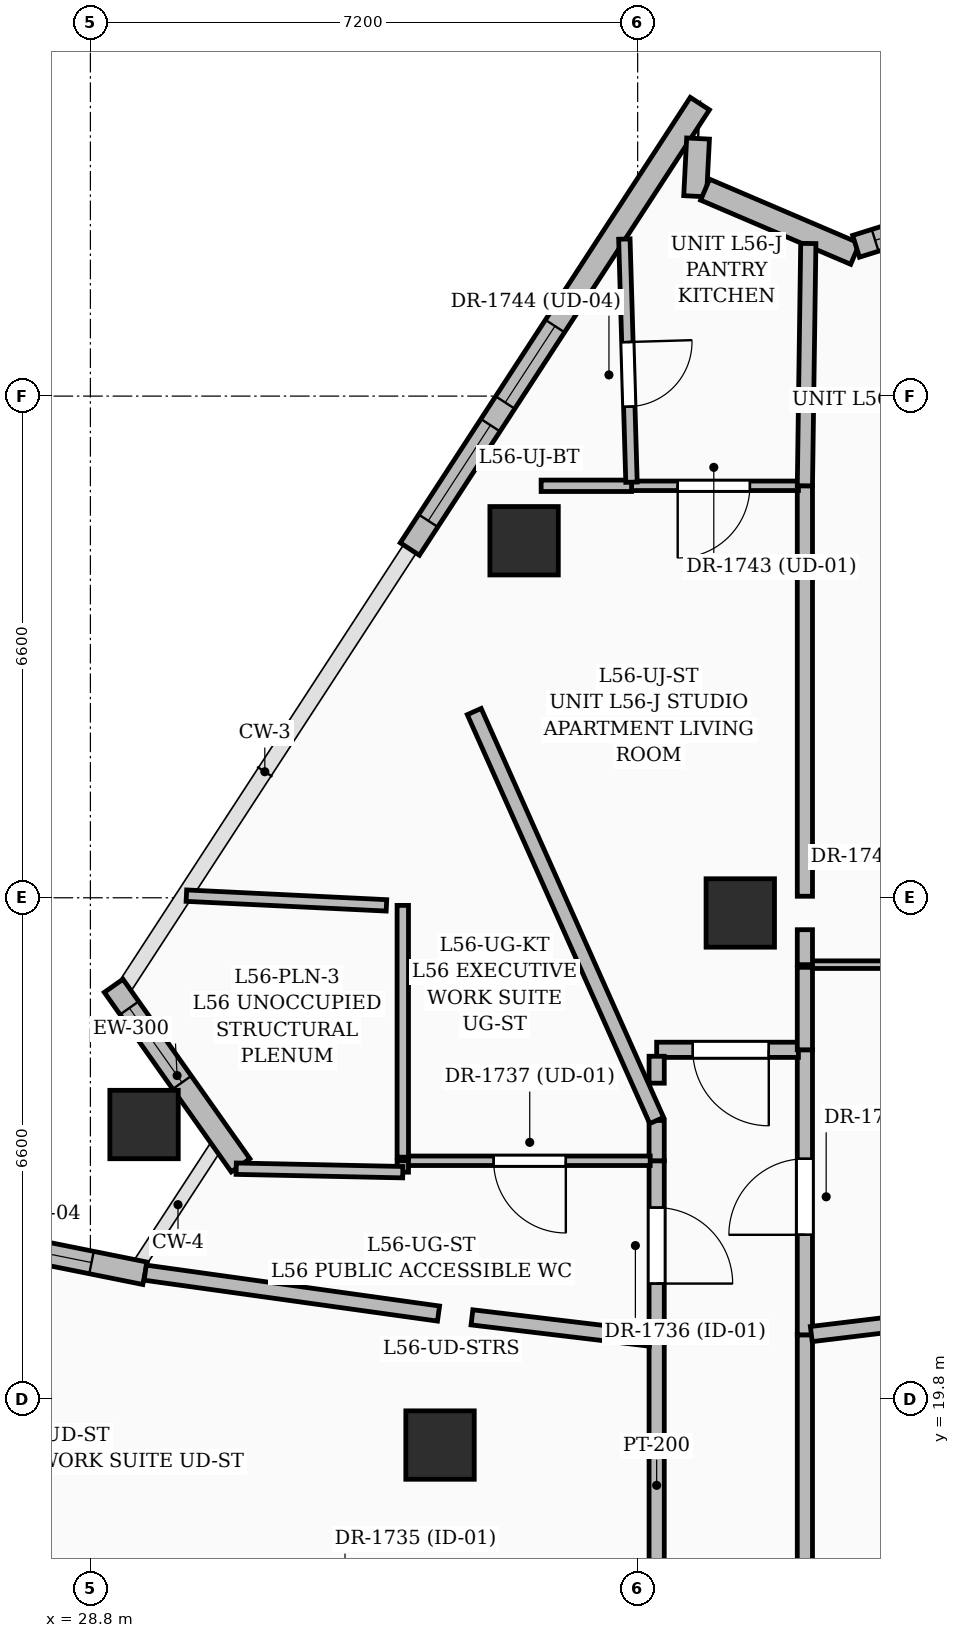
"""IFC4 building model, lengths in metres.
Left out: names, types, materials, properties, quantities, classifications, styles, units other than length and angle.
Written with IfcOpenShell. Run it as: python <this file> out.ifc"""

import sys

from ifc_helpers import new_model, si_unit, direction, frame, frame_2d, origin, origin_2d, place, context, subcontext, project, spatial, rectangle, extrude, element, fill, save


model = new_model("IFC4")
c1 = context("Model", 3, precision=1e-05, world=origin(), true_north=direction((0.0, 1.0)))
c2 = subcontext(c1, "Body", "Model", "MODEL_VIEW")
j1 = project(units=[si_unit("LENGTHUNIT", "METRE"), si_unit("PLANEANGLEUNIT", "RADIAN")], contexts=[c1])
p1 = place(None, origin())
s1 = spatial("IfcSite", under=j1, at=p1, CompositionType="ELEMENT")
p2 = place(p1, origin())
s2 = spatial("IfcBuilding", under=s1, at=p2, CompositionType="ELEMENT")
p3 = place(p2, frame((0.0, 0.0, 218.25)))
s3 = spatial("IfcBuildingStorey", under=s2, at=p3, CompositionType="ELEMENT", Elevation=218.25)
for number, where, z_axis, x_axis in (
    (1, (37.35, 26.2, 0.0), (0.0, 0.0, 1.0), (1.0, 0.0, 0.0)),
    (2, (33.4, 19.2, 0.0), (0.0, 0.0, 1.0), (1.0, 0.0, 0.0)),
    (3, (34.506, 31.097, 0.0), (0.0, 0.0, 1.0), (1.0, 0.0, 0.0)),
    (4, (29.506, 23.417, 0.0), (0.0, 0.0, 1.0), (1.0, 0.0, 0.0)),
):
    element("IfcColumn", number, at=place(p3, frame(where, z_axis=z_axis, x_axis=x_axis)), inside=s3, PredefinedType="COLUMN", context=c2, shape_type="SweptSolid", body=[
        extrude(rectangle(XDim=0.9, YDim=0.9, at=origin_2d()), origin(), (0.0, 0.0, 1.0), 3.75),
    ])
p4 = place(p3, frame((26.977, 21.971, 0.0), z_axis=(0.0, 0.0, 1.0), x_axis=(0.980377387813, -0.197129849249, 0.0)))
e5 = element("IfcWall", 5, at=p4, inside=s3, PredefinedType="SOLIDWALL", context=c2, shape_type="SweptSolid", body=[
    extrude(rectangle(XDim=2.593, YDim=0.3, at=frame_2d((1.297, 0.0))), origin(), (0.0, 0.0, 1.0), 2.825),
])
p5 = place(p4, frame((0.675, 0.0, 0.8)))
e6 = element("IfcOpeningElement", 6, at=p5, cuts=e5, PredefinedType="OPENING", context=c2, shape_type="SweptSolid", body=[
    extrude(rectangle(XDim=1.2, YDim=1.8, at=frame_2d((0.6, 0.9))), frame((0.0, 0.16, 0.0), z_axis=(0.0, -1.0, 0.0), x_axis=(1.0, 0.0, 0.0)), (0.0, 0.0, 1.0), 0.32),
])
p6 = place(p3, frame((30.776, 22.88, 0.0), z_axis=(0.0, 0.0, 1.0), x_axis=(-0.577262988454, 0.816558290731, 0.0)))
e7 = element("IfcWall", 7, at=p6, inside=s3, PredefinedType="SOLIDWALL", context=c2, shape_type="SweptSolid", body=[
    extrude(rectangle(XDim=2.892, YDim=0.3, at=frame_2d((1.446, 0.0))), origin(), (0.0, 0.0, 1.0), 2.825),
])
p7 = place(p6, frame((1.335, 0.0, 0.8)))
e8 = element("IfcOpeningElement", 8, at=p7, cuts=e7, PredefinedType="OPENING", context=c2, shape_type="SweptSolid", body=[
    extrude(rectangle(XDim=1.2, YDim=1.8, at=frame_2d((0.6, 0.9))), frame((0.0, 0.16, 0.0), z_axis=(0.0, -1.0, 0.0), x_axis=(1.0, 0.0, 0.0)), (0.0, 0.0, 1.0), 0.32),
])
p8 = place(p3, frame((33.002, 30.988, 0.0), z_axis=(0.0, 0.0, 1.0), x_axis=(0.545668039772, 0.838001426234, 0.0)))
e9 = element("IfcWall", 9, at=p8, inside=s3, PredefinedType="SOLIDWALL", context=c2, shape_type="SweptSolid", body=[
    extrude(rectangle(XDim=6.993, YDim=0.3, at=frame_2d((3.496, 0.0))), origin(), (0.0, 0.0, 1.0), 3.5),
])
p9 = place(p8, frame((2.3, 0.0, 0.8)))
e10 = element("IfcOpeningElement", 10, at=p9, cuts=e9, PredefinedType="OPENING", context=c2, shape_type="SweptSolid", body=[
    extrude(rectangle(XDim=1.2, YDim=1.8, at=frame_2d((0.6, 0.9))), frame((0.0, 0.16, 0.0), z_axis=(0.0, -1.0, 0.0), x_axis=(1.0, 0.0, 0.0)), (0.0, 0.0, 1.0), 0.32),
])
p10 = place(p8, frame((0.444, 0.0, 0.6)))
e11 = element("IfcOpeningElement", 11, at=p10, cuts=e9, PredefinedType="OPENING", context=c2, shape_type="SweptSolid", body=[
    extrude(rectangle(XDim=1.5, YDim=2.1, at=frame_2d((0.75, 1.05))), frame((0.0, 0.16, 0.0), z_axis=(0.0, -1.0, 0.0), x_axis=(1.0, 0.0, 0.0)), (0.0, 0.0, 1.0), 0.32),
])
p11 = place(p3, frame((36.795, 36.389, 0.0), z_axis=(0.0, 0.0, 1.0), x_axis=(-0.051042347118, -0.998696489831, 0.0)))
e12 = element("IfcWall", 12, at=p11, inside=s3, PredefinedType="SOLIDWALL", context=c2, shape_type="SweptSolid", body=[
    extrude(rectangle(XDim=0.76, YDim=0.3, at=frame_2d((0.38, 0.0))), origin(), (0.0, 0.0, 1.0), 3.5),
])
p12 = place(p3, frame((36.887, 35.716, 0.0), z_axis=(0.0, 0.0, 1.0), x_axis=(0.919567916171, -0.392931097711, 0.0)))
e13 = element("IfcWall", 13, at=p12, inside=s3, PredefinedType="SOLIDWALL", context=c2, shape_type="SweptSolid", body=[
    extrude(rectangle(XDim=2.147, YDim=0.3, at=frame_2d((1.074, 0.0))), origin(), (0.0, 0.0, 1.0), 3.5),
])
p13 = place(p3, frame((38.873, 34.971, 0.0), z_axis=(0.0, 0.0, 1.0), x_axis=(0.954555183372, 0.298034229407, 0.0)))
e14 = element("IfcWall", 14, at=p13, inside=s3, PredefinedType="SOLIDWALL", context=c2, shape_type="SweptSolid", body=[
    extrude(rectangle(XDim=2.136, YDim=0.3, at=frame_2d((1.068, 0.0))), origin(), (0.0, 0.0, 1.0), 3.5),
])
p14 = place(p13, frame((0.263, 0.0, 0.8)))
e15 = element("IfcOpeningElement", 15, at=p14, cuts=e14, PredefinedType="OPENING", context=c2, shape_type="SweptSolid", body=[
    extrude(rectangle(XDim=1.2, YDim=1.8, at=frame_2d((0.6, 0.9))), frame((0.0, 0.16, 0.0), z_axis=(0.0, -1.0, 0.0), x_axis=(1.0, 0.0, 0.0)), (0.0, 0.0, 1.0), 0.32),
])
p15 = place(p3, frame((36.25, 20.59, 0.0), z_axis=(0.0, 0.0, 1.0), x_axis=(0.0, -1.0, 0.0)))
e16 = element("IfcWall", 16, at=p15, inside=s3, PredefinedType="PARTITIONING", context=c2, shape_type="SweptSolid", body=[
    extrude(rectangle(XDim=3.84, YDim=0.2, at=frame_2d((1.92, 0.0))), origin(), (0.0, 0.0, 1.0), 3.5),
])
p16 = place(p3, frame((38.2, 16.835, 0.0), z_axis=(0.0, 0.0, 1.0), x_axis=(0.0, 1.0, 0.0)))
e17 = element("IfcWall", 17, at=p16, inside=s3, PredefinedType="PARTITIONING", context=c2, shape_type="SweptSolid", body=[
    extrude(rectangle(XDim=3.815, YDim=0.2, at=frame_2d((1.907, 0.0))), origin(), (0.0, 0.0, 1.0), 3.5),
])
p17 = place(p3, frame((36.25, 22.94, 0.0), z_axis=(0.0, 0.0, 1.0), x_axis=(0.0, -1.0, 0.0)))
e18 = element("IfcWall", 18, at=p17, inside=s3, PredefinedType="PARTITIONING", context=c2, shape_type="SweptSolid", body=[
    extrude(rectangle(XDim=2.35, YDim=0.2, at=frame_2d((1.175, 0.0))), origin(), (0.0, 0.0, 1.0), 3.5),
])
p18 = place(p17, frame((0.615, 0.0, 0.0)))
e19 = element("IfcOpeningElement", 19, at=p18, cuts=e18, PredefinedType="OPENING", context=c2, shape_type="SweptSolid", body=[
    extrude(rectangle(XDim=1.0, YDim=2.2, at=frame_2d((0.5, 1.1))), frame((0.0, 0.11, 0.0), z_axis=(0.0, -1.0, 0.0), x_axis=(1.0, 0.0, 0.0)), (0.0, 0.0, 1.0), 0.22),
])
p19 = place(p3, frame((36.25, 23.47, 0.0), z_axis=(0.0, 0.0, 1.0), x_axis=(0.0, -1.0, 0.0)))
e20 = element("IfcWall", 20, at=p19, inside=s3, PredefinedType="PARTITIONING", context=c2, shape_type="SweptSolid", body=[
    extrude(rectangle(XDim=0.53, YDim=0.2, at=frame_2d((0.265, 0.0))), origin(), (0.0, 0.0, 1.0), 3.5),
])
p20 = place(p3, frame((38.2, 20.65, 0.0), z_axis=(0.0, 0.0, 1.0), x_axis=(0.0, 1.0, 0.0)))
e21 = element("IfcWall", 21, at=p20, inside=s3, PredefinedType="PARTITIONING", context=c2, shape_type="SweptSolid", body=[
    extrude(rectangle(XDim=3.75, YDim=0.2, at=frame_2d((1.875, 0.0))), origin(), (0.0, 0.0, 1.0), 3.5),
])
p21 = place(p20, frame((1.316, 0.0, 0.0)))
e22 = element("IfcOpeningElement", 22, at=p21, cuts=e21, PredefinedType="OPENING", context=c2, shape_type="SweptSolid", body=[
    extrude(rectangle(XDim=1.0, YDim=2.2, at=frame_2d((0.5, 1.1))), frame((0.0, 0.11, 0.0), z_axis=(0.0, -1.0, 0.0), x_axis=(1.0, 0.0, 0.0)), (0.0, 0.0, 1.0), 0.22),
])
p22 = place(p3, frame((38.115, 24.4, 0.0), z_axis=(0.0, 0.0, 1.0), x_axis=(-1.0, 0.0, 0.0)))
e23 = element("IfcWall", 23, at=p22, inside=s3, PredefinedType="PARTITIONING", context=c2, shape_type="SweptSolid", body=[
    extrude(rectangle(XDim=1.865, YDim=0.2, at=frame_2d((0.933, 0.0))), origin(), (0.0, 0.0, 1.0), 2.685),
])
p23 = place(p22, frame((0.39, 0.0, 0.0)))
e24 = element("IfcOpeningElement", 24, at=p23, cuts=e23, PredefinedType="OPENING", context=c2, shape_type="SweptSolid", body=[
    extrude(rectangle(XDim=1.0, YDim=2.2, at=frame_2d((0.5, 1.1))), frame((0.0, 0.11, 0.0), z_axis=(0.0, -1.0, 0.0), x_axis=(1.0, 0.0, 0.0)), (0.0, 0.0, 1.0), 0.22),
])
p24 = place(p3, frame((36.25, 24.315, 0.0), z_axis=(0.0, 0.0, 1.0), x_axis=(0.0, -1.0, 0.0)))
e25 = element("IfcWall", 25, at=p24, inside=s3, PredefinedType="PARTITIONING", context=c2, shape_type="SweptSolid", body=[
    extrude(rectangle(XDim=0.354, YDim=0.2, at=frame_2d((0.177, 0.0))), origin(), (0.0, 0.0, 1.0), 2.685),
])
p25 = place(p3, frame((36.166, 20.6, 0.0), z_axis=(0.0, 0.0, 1.0), x_axis=(-0.992960225827, 0.118448258436, 0.0)))
e26 = element("IfcWall", 26, at=p25, inside=s3, PredefinedType="PARTITIONING", context=c2, shape_type="SweptSolid", body=[
    extrude(rectangle(XDim=2.362, YDim=0.2, at=frame_2d((1.181, 0.0))), origin(), (0.0, 0.0, 1.0), 2.685),
])
p26 = place(p3, frame((41.84, 21.09, 0.0), z_axis=(0.0, 0.0, 1.0), x_axis=(-0.99276902526, -0.120040253604, 0.0)))
e27 = element("IfcWall", 27, at=p26, inside=s3, PredefinedType="PARTITIONING", context=c2, shape_type="SweptSolid", body=[
    extrude(rectangle(XDim=3.582, YDim=0.2, at=frame_2d((1.791, 0.0))), origin(), (0.0, 0.0, 1.0), 3.5),
])
p27 = place(p3, frame((36.165, 22.94, 0.0), z_axis=(0.0, 0.0, 1.0), x_axis=(-1.0, 0.0, 0.0)))
e28 = element("IfcWall", 28, at=p27, inside=s3, PredefinedType="PARTITIONING", context=c2, shape_type="SweptSolid", body=[
    extrude(rectangle(XDim=3.255, YDim=0.125, at=frame_2d((1.627, 0.0))), origin(), (0.0, 0.0, 1.0), 2.685),
])
p28 = place(p27, frame((1.11, 0.0, 0.0)))
e29 = element("IfcOpeningElement", 29, at=p28, cuts=e28, PredefinedType="OPENING", context=c2, shape_type="SweptSolid", body=[
    extrude(rectangle(XDim=0.95, YDim=2.2, at=frame_2d((0.475, 1.1))), frame((0.0, 0.072, 0.0), z_axis=(0.0, -1.0, 0.0), x_axis=(1.0, 0.0, 0.0)), (0.0, 0.0, 1.0), 0.145),
])
p29 = place(p3, frame((32.91, 22.94, 0.0), z_axis=(0.0, 0.0, 1.0), x_axis=(0.0, -1.0, 0.0)))
e30 = element("IfcWall", 30, at=p29, inside=s3, PredefinedType="PARTITIONING", context=c2, shape_type="SweptSolid", body=[
    extrude(rectangle(XDim=0.15, YDim=0.15, at=frame_2d((0.075, 0.0))), origin(), (0.0, 0.0, 1.0), 3.5),
])
p30 = place(p3, frame((32.91, 22.79, 0.0), z_axis=(0.0, 0.0, 1.0), x_axis=(-0.999780828689, 0.020935486277, 0.0)))
e31 = element("IfcWall", 31, at=p30, inside=s3, PredefinedType="PARTITIONING", context=c2, shape_type="SweptSolid", body=[
    extrude(rectangle(XDim=2.192, YDim=0.15, at=frame_2d((1.096, 0.0))), origin(), (0.0, 0.0, 1.0), 2.685),
])
p31 = place(p3, frame((32.91, 26.3, 0.0), z_axis=(0.0, 0.0, 1.0), x_axis=(0.0, -1.0, 0.0)))
e32 = element("IfcWall", 32, at=p31, inside=s3, PredefinedType="PARTITIONING", context=c2, shape_type="SweptSolid", body=[
    extrude(rectangle(XDim=3.312, YDim=0.15, at=frame_2d((1.656, 0.0))), origin(), (0.0, 0.0, 1.0), 2.862),
])
p32 = place(p3, frame((36.25, 23.47, 0.0), z_axis=(0.0, 0.0, 1.0), x_axis=(-0.40737623058, 0.913260426581, 0.0)))
e33 = element("IfcWall", 33, at=p32, inside=s3, PredefinedType="PARTITIONING", context=c2, shape_type="SweptSolid", body=[
    extrude(rectangle(XDim=5.891, YDim=0.2, at=frame_2d((2.946, 0.0))), origin(), (0.0, 0.0, 1.0), 2.685),
])
p33 = place(p3, frame((41.792, 25.52, 0.0), z_axis=(0.0, 0.0, 1.0), x_axis=(-1.0, 0.0, 0.0)))
e34 = element("IfcWall", 34, at=p33, inside=s3, PredefinedType="PARTITIONING", context=c2, shape_type="SweptSolid", body=[
    extrude(rectangle(XDim=3.593, YDim=0.1, at=frame_2d((1.796, 0.0))), origin(), (0.0, 0.0, 1.0), 3.5),
])
p34 = place(p33, frame((1.264, 0.0, 0.0)))
e35 = element("IfcOpeningElement", 35, at=p34, cuts=e34, PredefinedType="OPENING", context=c2, shape_type="SweptSolid", body=[
    extrude(rectangle(XDim=0.9, YDim=2.15, at=frame_2d((0.45, 1.075))), frame((0.0, 0.06, 0.0), z_axis=(0.0, -1.0, 0.0), x_axis=(1.0, 0.0, 0.0)), (0.0, 0.0, 1.0), 0.12),
])
p35 = place(p3, frame((38.2, 25.485, 0.0), z_axis=(0.0, 0.0, 1.0), x_axis=(0.0, -1.0, 0.0)))
e36 = element("IfcWall", 36, at=p35, inside=s3, PredefinedType="PARTITIONING", context=c2, shape_type="SweptSolid", body=[
    extrude(rectangle(XDim=1.085, YDim=0.2, at=frame_2d((0.542, 0.0))), origin(), (0.0, 0.0, 1.0), 3.5),
])
p36 = place(p3, frame((38.2, 25.98, 0.0), z_axis=(0.0, 0.0, 1.0), x_axis=(0.0, -1.0, 0.0)))
e37 = element("IfcWall", 37, at=p36, inside=s3, PredefinedType="PARTITIONING", context=c2, shape_type="SweptSolid", body=[
    extrude(rectangle(XDim=0.46, YDim=0.2, at=frame_2d((0.23, 0.0))), origin(), (0.0, 0.0, 1.0), 2.52),
])
p37 = place(p3, frame((38.2, 31.82, 0.0), z_axis=(0.0, 0.0, 1.0), x_axis=(0.0, -1.0, 0.0)))
e38 = element("IfcWall", 38, at=p37, inside=s3, PredefinedType="PARTITIONING", context=c2, shape_type="SweptSolid", body=[
    extrude(rectangle(XDim=5.4, YDim=0.2, at=frame_2d((2.7, 0.0))), origin(), (0.0, 0.0, 1.0), 2.52),
])
p38 = place(p3, frame((38.115, 31.82, 0.0), z_axis=(0.0, 0.0, 1.0), x_axis=(-1.0, 0.0, 0.0)))
e39 = element("IfcWall", 39, at=p38, inside=s3, PredefinedType="PARTITIONING", context=c2, shape_type="SweptSolid", body=[
    extrude(rectangle(XDim=2.195, YDim=0.125, at=frame_2d((1.098, 0.0))), origin(), (0.0, 0.0, 1.0), 3.5),
])
p39 = place(p38, frame((0.638, 0.0, 0.0)))
e40 = element("IfcOpeningElement", 40, at=p39, cuts=e39, PredefinedType="OPENING", context=c2, shape_type="SweptSolid", body=[
    extrude(rectangle(XDim=0.95, YDim=2.2, at=frame_2d((0.475, 1.1))), frame((0.0, 0.072, 0.0), z_axis=(0.0, -1.0, 0.0), x_axis=(1.0, 0.0, 0.0)), (0.0, 0.0, 1.0), 0.145),
])
p40 = place(p3, frame((35.92, 31.82, 0.0), z_axis=(0.0, 0.0, 1.0), x_axis=(-1.0, 0.0, 0.0)))
e41 = element("IfcWall", 41, at=p40, inside=s3, PredefinedType="PARTITIONING", context=c2, shape_type="SweptSolid", body=[
    extrude(rectangle(XDim=1.19, YDim=0.15, at=frame_2d((0.595, 0.0))), origin(), (0.0, 0.0, 1.0), 3.5),
])
p41 = place(p3, frame((35.825, 35.066, 0.0), z_axis=(0.0, 0.0, 1.0), x_axis=(0.029374388568, -0.999568479543, 0.0)))
e42 = element("IfcWall", 42, at=p41, inside=s3, PredefinedType="PARTITIONING", context=c2, shape_type="SweptSolid", body=[
    extrude(rectangle(XDim=3.2, YDim=0.15, at=frame_2d((1.6, 0.0))), origin(), (0.0, 0.0, 1.0), 3.5),
])
p42 = place(p41, frame((1.355, 0.0, 0.0)))
e43 = element("IfcOpeningElement", 43, at=p42, cuts=e42, PredefinedType="OPENING", context=c2, shape_type="SweptSolid", body=[
    extrude(rectangle(XDim=0.85, YDim=2.1, at=frame_2d((0.425, 1.05))), frame((0.0, 0.085, 0.0), z_axis=(0.0, -1.0, 0.0), x_axis=(1.0, 0.0, 0.0)), (0.0, 0.0, 1.0), 0.17),
])
p43 = place(p3, frame((33.38, 20.93, 0.0), z_axis=(0.0, 0.0, 1.0), x_axis=(-0.990417656007, 0.138104549781, 0.0)))
e44 = element("IfcWall", 44, at=p43, inside=s3, PredefinedType="PARTITIONING", context=c2, shape_type="SweptSolid", body=[
    extrude(rectangle(XDim=3.896, YDim=0.2, at=frame_2d((1.948, 0.0))), origin(), (0.0, 0.0, 1.0), 2.685),
])
p44 = place(p3, frame((38.245, 35.008, 0.0), z_axis=(0.0, 0.0, 1.0), x_axis=(-0.014166138476, -0.999899655226, 0.0)))
e45 = element("IfcWall", 45, at=p44, inside=s3, PredefinedType="PARTITIONING", context=c2, shape_type="SweptSolid", body=[
    extrude(rectangle(XDim=3.188, YDim=0.2, at=frame_2d((1.594, 0.0))), origin(), (0.0, 0.0, 1.0), 3.5),
])
p45 = place(p3, frame((32.695, 26.3, 0.0), z_axis=(0.0, 0.0, 1.0), x_axis=(-0.998820913, 0.048546717226, 0.0)))
e46 = element("IfcWall", 46, at=p45, inside=s3, PredefinedType="PARTITIONING", context=c2, shape_type="SweptSolid", body=[
    extrude(rectangle(XDim=2.635, YDim=0.15, at=frame_2d((1.318, 0.0))), origin(), (0.0, 0.0, 1.0), 2.82),
])
p46 = place(p5, origin())
e47 = element("IfcWindow", 47, at=p46, inside=s3, PartitioningType="SINGLE_PANEL", PredefinedType="WINDOW", context=c2, shape_type="SweptSolid", body=[
    extrude(rectangle(XDim=1.2, YDim=1.8, at=frame_2d((0.6, 0.9))), frame((0.0, 0.03, 0.0), z_axis=(0.0, -1.0, 0.0), x_axis=(1.0, 0.0, 0.0)), (0.0, 0.0, 1.0), 0.06),
])
fill(e6, e47)
p47 = place(p7, origin())
e48 = element("IfcWindow", 48, at=p47, inside=s3, PartitioningType="SINGLE_PANEL", PredefinedType="WINDOW", context=c2, shape_type="SweptSolid", body=[
    extrude(rectangle(XDim=1.2, YDim=1.8, at=frame_2d((0.6, 0.9))), frame((0.0, 0.03, 0.0), z_axis=(0.0, -1.0, 0.0), x_axis=(1.0, 0.0, 0.0)), (0.0, 0.0, 1.0), 0.06),
])
fill(e8, e48)
p48 = place(p9, origin())
e49 = element("IfcWindow", 49, at=p48, inside=s3, PartitioningType="SINGLE_PANEL", PredefinedType="WINDOW", context=c2, shape_type="SweptSolid", body=[
    extrude(rectangle(XDim=1.2, YDim=1.8, at=frame_2d((0.6, 0.9))), frame((0.0, 0.03, 0.0), z_axis=(0.0, -1.0, 0.0), x_axis=(1.0, 0.0, 0.0)), (0.0, 0.0, 1.0), 0.06),
])
fill(e10, e49)
p49 = place(p14, origin())
e50 = element("IfcWindow", 50, at=p49, inside=s3, PartitioningType="SINGLE_PANEL", PredefinedType="WINDOW", context=c2, shape_type="SweptSolid", body=[
    extrude(rectangle(XDim=1.2, YDim=1.8, at=frame_2d((0.6, 0.9))), frame((0.0, 0.03, 0.0), z_axis=(0.0, -1.0, 0.0), x_axis=(1.0, 0.0, 0.0)), (0.0, 0.0, 1.0), 0.06),
])
fill(e15, e50)
p50 = place(p18, origin())
e51 = element("IfcDoor", 51, at=p50, inside=s3, OperationType="SINGLE_SWING_RIGHT", PredefinedType="DOOR", context=c2, shape_type="SweptSolid", body=[
    extrude(rectangle(XDim=1.0, YDim=2.2, at=frame_2d((0.5, 1.1))), frame((0.0, 0.025, 0.0), z_axis=(0.0, -1.0, 0.0), x_axis=(1.0, 0.0, 0.0)), (0.0, 0.0, 1.0), 0.05),
])
fill(e19, e51)
p51 = place(p28, origin())
e52 = element("IfcDoor", 52, at=p51, inside=s3, OperationType="SINGLE_SWING_LEFT", PredefinedType="DOOR", context=c2, shape_type="SweptSolid", body=[
    extrude(rectangle(XDim=0.95, YDim=2.2, at=frame_2d((0.475, 1.1))), frame((0.0, 0.025, 0.0), z_axis=(0.0, -1.0, 0.0), x_axis=(1.0, 0.0, 0.0)), (0.0, 0.0, 1.0), 0.05),
])
fill(e29, e52)
p52 = place(p21, origin())
e53 = element("IfcDoor", 53, at=p52, inside=s3, OperationType="SINGLE_SWING_LEFT", PredefinedType="DOOR", context=c2, shape_type="SweptSolid", body=[
    extrude(rectangle(XDim=1.0, YDim=2.2, at=frame_2d((0.5, 1.1))), frame((0.0, 0.025, 0.0), z_axis=(0.0, -1.0, 0.0), x_axis=(1.0, 0.0, 0.0)), (0.0, 0.0, 1.0), 0.05),
])
fill(e22, e53)
p53 = place(p23, origin())
e54 = element("IfcDoor", 54, at=p53, inside=s3, OperationType="SINGLE_SWING_LEFT", PredefinedType="DOOR", context=c2, shape_type="SweptSolid", body=[
    extrude(rectangle(XDim=1.0, YDim=2.2, at=frame_2d((0.5, 1.1))), frame((0.0, 0.025, 0.0), z_axis=(0.0, -1.0, 0.0), x_axis=(1.0, 0.0, 0.0)), (0.0, 0.0, 1.0), 0.05),
])
fill(e24, e54)
p54 = place(p39, origin())
e55 = element("IfcDoor", 55, at=p54, inside=s3, OperationType="SINGLE_SWING_RIGHT", PredefinedType="DOOR", context=c2, shape_type="SweptSolid", body=[
    extrude(rectangle(XDim=0.95, YDim=2.2, at=frame_2d((0.475, 1.1))), frame((0.0, 0.025, 0.0), z_axis=(0.0, -1.0, 0.0), x_axis=(1.0, 0.0, 0.0)), (0.0, 0.0, 1.0), 0.05),
])
fill(e40, e55)
p55 = place(p42, origin())
e56 = element("IfcDoor", 56, at=p55, inside=s3, OperationType="SINGLE_SWING_LEFT", PredefinedType="DOOR", context=c2, shape_type="SweptSolid", body=[
    extrude(rectangle(XDim=0.85, YDim=2.1, at=frame_2d((0.425, 1.05))), frame((0.0, 0.025, 0.0), z_axis=(0.0, -1.0, 0.0), x_axis=(1.0, 0.0, 0.0)), (0.0, 0.0, 1.0), 0.05),
])
fill(e43, e56)
p56 = place(p10, origin())
e57 = element("IfcWindow", 57, at=p56, inside=s3, PartitioningType="SINGLE_PANEL", PredefinedType="WINDOW", context=c2, shape_type="SweptSolid", body=[
    extrude(rectangle(XDim=1.5, YDim=2.1, at=frame_2d((0.75, 1.05))), frame((0.0, 0.03, 0.0), z_axis=(0.0, -1.0, 0.0), x_axis=(1.0, 0.0, 0.0)), (0.0, 0.0, 1.0), 0.06),
])
fill(e11, e57)
save(model, sys.argv[1])
